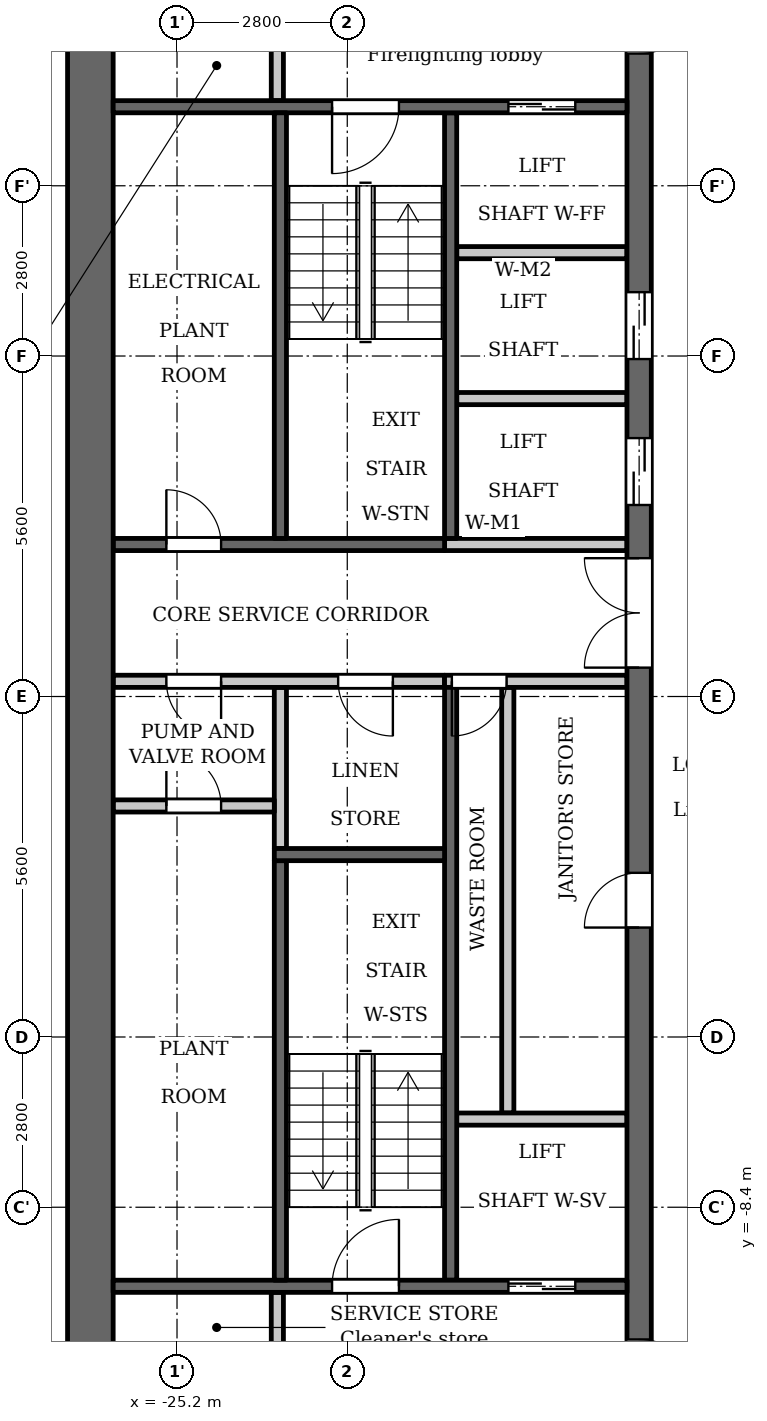
"""IFC4 building model, lengths in metres.
Left out: names, types, materials, properties, quantities, classifications, styles, units other than length and angle.
Written with IfcOpenShell. Run it as: python <this file> out.ifc"""

import sys

from ifc_helpers import new_model, si_unit, direction, frame, frame_2d, origin, place, context, subcontext, project, spatial, rectangle, extrude, element, fill, save


model = new_model("IFC4")
c1 = context("Model", 3, precision=1e-05, world=origin(), true_north=direction((0.0, 1.0)))
c2 = subcontext(c1, "Body", "Model", "MODEL_VIEW")
j1 = project(units=[si_unit("LENGTHUNIT", "METRE"), si_unit("PLANEANGLEUNIT", "RADIAN")], contexts=[c1])
p1 = place(None, origin())
s1 = spatial("IfcSite", under=j1, at=p1, CompositionType="ELEMENT")
p2 = place(p1, origin())
s2 = spatial("IfcBuilding", under=s1, at=p2, CompositionType="ELEMENT")
p3 = place(p2, frame((0.0, 0.0, 167.6)))
s3 = spatial("IfcBuildingStorey", under=s2, at=p3, CompositionType="ELEMENT", Elevation=167.6)
p4 = place(p3, frame((-23.5, -2.5, 0.0), z_axis=(0.0, 0.0, 1.0), x_axis=(0.0, 1.0, 0.0)))
e1 = element("IfcWall", 1, at=p4, inside=s3, PredefinedType="PARTITIONING", context=c2, shape_type="SweptSolid", body=[
    extrude(rectangle(XDim=2.65, YDim=0.2, at=frame_2d((1.325, 0.0))), origin(), (0.0, 0.0, 1.0), 3.2),
])
p5 = place(p3, frame((-20.7, 2.6, 0.0), z_axis=(0.0, 0.0, 1.0), x_axis=(0.0, 1.0, 0.0)))
e2 = element("IfcWall", 2, at=p5, inside=s3, PredefinedType="SHEAR", context=c2, shape_type="SweptSolid", body=[
    extrude(rectangle(XDim=7.0, YDim=0.2, at=frame_2d((3.5, 0.0))), origin(), (0.0, 0.0, 1.0), 3.2),
])
p6 = place(p3, frame((-20.7, -9.6, 0.0), z_axis=(0.0, 0.0, 1.0), x_axis=(0.0, 1.0, 0.0)))
e3 = element("IfcWall", 3, at=p6, inside=s3, PredefinedType="SHEAR", context=c2, shape_type="SweptSolid", body=[
    extrude(rectangle(XDim=9.75, YDim=0.2, at=frame_2d((4.875, 0.0))), origin(), (0.0, 0.0, 1.0), 3.2),
])
p7 = place(p3, frame((-20.8, 2.5, 0.0), z_axis=(0.0, 0.0, 1.0), x_axis=(-1.0, 0.0, 0.0)))
e4 = element("IfcWall", 4, at=p7, inside=s3, PredefinedType="SHEAR", context=c2, shape_type="SweptSolid", body=[
    extrude(rectangle(XDim=5.45, YDim=0.2, at=frame_2d((2.725, 0.0))), origin(), (0.0, 0.0, 1.0), 3.2),
])
p8 = place(p7, frame((3.675, 0.0, 0.0)))
e5 = element("IfcOpeningElement", 5, at=p8, cuts=e4, PredefinedType="OPENING", context=c2, shape_type="SweptSolid", body=[
    extrude(rectangle(XDim=0.9, YDim=2.1, at=frame_2d((0.45, 1.05))), frame((0.0, 0.11, 0.0), z_axis=(0.0, -1.0, 0.0), x_axis=(1.0, 0.0, 0.0)), (0.0, 0.0, 1.0), 0.22),
])
p9 = place(p3, frame((-20.8, 0.25, 0.0), z_axis=(0.0, 0.0, 1.0), x_axis=(-1.0, 0.0, 0.0)))
e6 = element("IfcWall", 6, at=p9, inside=s3, PredefinedType="PARTITIONING", context=c2, shape_type="SweptSolid", body=[
    extrude(rectangle(XDim=5.45, YDim=0.2, at=frame_2d((2.725, 0.0))), origin(), (0.0, 0.0, 1.0), 3.2),
])
p10 = place(p9, frame((0.85, 0.0, 0.0)))
e7 = element("IfcOpeningElement", 7, at=p10, cuts=e6, PredefinedType="OPENING", context=c2, shape_type="SweptSolid", body=[
    extrude(rectangle(XDim=0.9, YDim=2.1, at=frame_2d((0.45, 1.05))), frame((0.0, 0.11, 0.0), z_axis=(0.0, -1.0, 0.0), x_axis=(1.0, 0.0, 0.0)), (0.0, 0.0, 1.0), 0.22),
])
p11 = place(p9, frame((3.675, 0.0, 0.0)))
e8 = element("IfcOpeningElement", 8, at=p11, cuts=e6, PredefinedType="OPENING", context=c2, shape_type="SweptSolid", body=[
    extrude(rectangle(XDim=0.9, YDim=2.1, at=frame_2d((0.45, 1.05))), frame((0.0, 0.11, 0.0), z_axis=(0.0, -1.0, 0.0), x_axis=(1.0, 0.0, 0.0)), (0.0, 0.0, 1.0), 0.22),
])
p12 = place(p3, frame((-19.76, -6.85, 0.0), z_axis=(0.0, 0.0, 1.0), x_axis=(0.0, 1.0, 0.0)))
e9 = element("IfcWall", 9, at=p12, inside=s3, PredefinedType="PARTITIONING", context=c2, shape_type="SweptSolid", body=[
    extrude(rectangle(XDim=7.0, YDim=0.2, at=frame_2d((3.5, 0.0))), origin(), (0.0, 0.0, 1.0), 3.2),
])
p13 = place(p3, frame((-17.6, -12.45, 0.0), z_axis=(0.0, 0.0, 1.0), x_axis=(0.0, 1.0, 0.0)))
e10 = element("IfcWall", 10, at=p13, inside=s3, PredefinedType="SHEAR", context=c2, shape_type="SweptSolid", body=[
    extrude(rectangle(XDim=24.9, YDim=0.4, at=frame_2d((12.45, 0.0))), origin(), (0.0, 0.0, 1.0), 3.2),
])
p14 = place(p13, frame((8.65, 0.0, 0.0)))
e11 = element("IfcOpeningElement", 11, at=p14, cuts=e10, PredefinedType="OPENING", context=c2, shape_type="SweptSolid", body=[
    extrude(rectangle(XDim=0.9, YDim=2.1, at=frame_2d((0.45, 1.05))), frame((0.0, 0.21, 0.0), z_axis=(0.0, -1.0, 0.0), x_axis=(1.0, 0.0, 0.0)), (0.0, 0.0, 1.0), 0.42),
])
p15 = place(p13, frame((15.6, 0.0, 0.0)))
e12 = element("IfcOpeningElement", 12, at=p15, cuts=e10, PredefinedType="OPENING", context=c2, shape_type="SweptSolid", body=[
    extrude(rectangle(XDim=1.1, YDim=2.1, at=frame_2d((0.55, 1.05))), frame((0.0, 0.21, 0.0), z_axis=(0.0, -1.0, 0.0), x_axis=(1.0, 0.0, 0.0)), (0.0, 0.0, 1.0), 0.42),
])
p16 = place(p13, frame((18.0, 0.0, 0.0)))
e13 = element("IfcOpeningElement", 13, at=p16, cuts=e10, PredefinedType="OPENING", context=c2, shape_type="SweptSolid", body=[
    extrude(rectangle(XDim=1.1, YDim=2.1, at=frame_2d((0.55, 1.05))), frame((0.0, 0.21, 0.0), z_axis=(0.0, -1.0, 0.0), x_axis=(1.0, 0.0, 0.0)), (0.0, 0.0, 1.0), 0.42),
])
p17 = place(p13, frame((23.025, 0.0, 0.0)))
e14 = element("IfcOpeningElement", 14, at=p17, cuts=e10, PredefinedType="OPENING", context=c2, shape_type="SweptSolid", body=[
    extrude(rectangle(XDim=1.1, YDim=2.1, at=frame_2d((0.55, 1.05))), frame((0.0, 0.21, 0.0), z_axis=(0.0, -1.0, 0.0), x_axis=(1.0, 0.0, 0.0)), (0.0, 0.0, 1.0), 0.42),
])
p18 = place(p13, frame((0.775, 0.0, 0.0)))
e15 = element("IfcOpeningElement", 15, at=p18, cuts=e10, PredefinedType="OPENING", context=c2, shape_type="SweptSolid", body=[
    extrude(rectangle(XDim=1.1, YDim=2.1, at=frame_2d((0.55, 1.05))), frame((0.0, 0.21, 0.0), z_axis=(0.0, -1.0, 0.0), x_axis=(1.0, 0.0, 0.0)), (0.0, 0.0, 1.0), 0.42),
])
p19 = place(p13, frame((12.925, 0.0, 0.0)))
e16 = element("IfcOpeningElement", 16, at=p19, cuts=e10, PredefinedType="OPENING", context=c2, shape_type="SweptSolid", body=[
    extrude(rectangle(XDim=1.8, YDim=2.1, at=frame_2d((0.9, 1.05))), frame((0.0, 0.21, 0.0), z_axis=(0.0, -1.0, 0.0), x_axis=(1.0, 0.0, 0.0)), (0.0, 0.0, 1.0), 0.42),
])
p20 = place(p3, frame((-26.625, -12.45, 0.0), z_axis=(0.0, 0.0, 1.0), x_axis=(0.0, 1.0, 0.0)))
e17 = element("IfcWall", 17, at=p20, inside=s3, PredefinedType="SHEAR", context=c2, shape_type="SweptSolid", body=[
    extrude(rectangle(XDim=24.9, YDim=0.75, at=frame_2d((12.45, 0.0))), origin(), (0.0, 0.0, 1.0), 3.2),
])
p21 = place(p3, frame((-23.55, 9.8, 0.0), z_axis=(0.0, 0.0, 1.0), x_axis=(0.0, 1.0, 0.0)))
e18 = element("IfcWall", 18, at=p21, inside=s3, PredefinedType="PARTITIONING", context=c2, shape_type="SweptSolid", body=[
    extrude(rectangle(XDim=2.65, YDim=0.2, at=frame_2d((1.325, 0.0))), origin(), (0.0, 0.0, 1.0), 3.2),
])
p22 = place(p21, frame((0.875, 0.0, 0.0)))
e19 = element("IfcOpeningElement", 19, at=p22, cuts=e18, PredefinedType="OPENING", context=c2, shape_type="SweptSolid", body=[
    extrude(rectangle(XDim=0.9, YDim=2.1, at=frame_2d((0.45, 1.05))), frame((0.0, 0.11, 0.0), z_axis=(0.0, -1.0, 0.0), x_axis=(1.0, 0.0, 0.0)), (0.0, 0.0, 1.0), 0.22),
])
p23 = place(p3, frame((-23.55, -12.45, 0.0), z_axis=(0.0, 0.0, 1.0), x_axis=(0.0, 1.0, 0.0)))
e20 = element("IfcWall", 20, at=p23, inside=s3, PredefinedType="PARTITIONING", context=c2, shape_type="SweptSolid", body=[
    extrude(rectangle(XDim=2.65, YDim=0.2, at=frame_2d((1.325, 0.0))), origin(), (0.0, 0.0, 1.0), 3.2),
])
p24 = place(p23, frame((0.875, 0.0, 0.0)))
e21 = element("IfcOpeningElement", 21, at=p24, cuts=e20, PredefinedType="OPENING", context=c2, shape_type="SweptSolid", body=[
    extrude(rectangle(XDim=0.9, YDim=2.1, at=frame_2d((0.45, 1.05))), frame((0.0, 0.11, 0.0), z_axis=(0.0, -1.0, 0.0), x_axis=(1.0, 0.0, 0.0)), (0.0, 0.0, 1.0), 0.22),
])
p25 = place(p3, frame((-23.6, -1.8, 0.0), z_axis=(0.0, 0.0, 1.0), x_axis=(-1.0, 0.0, 0.0)))
e22 = element("IfcWall", 22, at=p25, inside=s3, PredefinedType="PARTITIONING", context=c2, shape_type="SweptSolid", body=[
    extrude(rectangle(XDim=2.65, YDim=0.2, at=frame_2d((1.325, 0.0))), origin(), (0.0, 0.0, 1.0), 3.2),
])
p26 = place(p25, frame((0.875, 0.0, 0.0)))
e23 = element("IfcOpeningElement", 23, at=p26, cuts=e22, PredefinedType="OPENING", context=c2, shape_type="SweptSolid", body=[
    extrude(rectangle(XDim=0.9, YDim=2.1, at=frame_2d((0.45, 1.05))), frame((0.0, 0.11, 0.0), z_axis=(0.0, -1.0, 0.0), x_axis=(1.0, 0.0, 0.0)), (0.0, 0.0, 1.0), 0.22),
])
p27 = place(p3, frame((-17.8, -9.7, 0.0), z_axis=(0.0, 0.0, 1.0), x_axis=(-1.0, 0.0, 0.0)))
e24 = element("IfcWall", 24, at=p27, inside=s3, PredefinedType="SHEAR", context=c2, shape_type="SweptSolid", body=[
    extrude(rectangle(XDim=8.45, YDim=0.2, at=frame_2d((4.225, 0.0))), origin(), (0.0, 0.0, 1.0), 3.2),
])
p28 = place(p27, frame((0.85, 0.0, 0.0)))
e25 = element("IfcOpeningElement", 25, at=p28, cuts=e24, PredefinedType="OPENING", context=c2, shape_type="SweptSolid", body=[
    extrude(rectangle(XDim=1.1, YDim=2.1, at=frame_2d((0.55, 1.05))), frame((0.0, 0.11, 0.0), z_axis=(0.0, -1.0, 0.0), x_axis=(1.0, 0.0, 0.0)), (0.0, 0.0, 1.0), 0.22),
])
p29 = place(p27, frame((3.75, 0.0, 0.0)))
e26 = element("IfcOpeningElement", 26, at=p29, cuts=e24, PredefinedType="OPENING", context=c2, shape_type="SweptSolid", body=[
    extrude(rectangle(XDim=1.1, YDim=2.1, at=frame_2d((0.55, 1.05))), frame((0.0, 0.11, 0.0), z_axis=(0.0, -1.0, 0.0), x_axis=(1.0, 0.0, 0.0)), (0.0, 0.0, 1.0), 0.22),
])
p30 = place(p3, frame((-17.8, -6.95, 0.0), z_axis=(0.0, 0.0, 1.0), x_axis=(-1.0, 0.0, 0.0)))
e27 = element("IfcWall", 27, at=p30, inside=s3, PredefinedType="PARTITIONING", context=c2, shape_type="SweptSolid", body=[
    extrude(rectangle(XDim=2.8, YDim=0.2, at=frame_2d((1.4, 0.0))), origin(), (0.0, 0.0, 1.0), 3.2),
])
p31 = place(p3, frame((-17.8, 0.25, 0.0), z_axis=(0.0, 0.0, 1.0), x_axis=(-1.0, 0.0, 0.0)))
e28 = element("IfcWall", 28, at=p31, inside=s3, PredefinedType="PARTITIONING", context=c2, shape_type="SweptSolid", body=[
    extrude(rectangle(XDim=3.0, YDim=0.2, at=frame_2d((1.5, 0.0))), origin(), (0.0, 0.0, 1.0), 3.2),
])
p32 = place(p31, frame((1.98, 0.0, 0.0)))
e29 = element("IfcOpeningElement", 29, at=p32, cuts=e28, PredefinedType="OPENING", context=c2, shape_type="SweptSolid", body=[
    extrude(rectangle(XDim=0.9, YDim=2.1, at=frame_2d((0.45, 1.05))), frame((0.0, 0.11, 0.0), z_axis=(0.0, -1.0, 0.0), x_axis=(1.0, 0.0, 0.0)), (0.0, 0.0, 1.0), 0.22),
])
p33 = place(p3, frame((-17.8, 2.5, 0.0), z_axis=(0.0, 0.0, 1.0), x_axis=(-1.0, 0.0, 0.0)))
e30 = element("IfcWall", 30, at=p33, inside=s3, PredefinedType="PARTITIONING", context=c2, shape_type="SweptSolid", body=[
    extrude(rectangle(XDim=3.0, YDim=0.2, at=frame_2d((1.5, 0.0))), origin(), (0.0, 0.0, 1.0), 3.2),
])
for number, where, z_axis, x_axis in (
    (31, (-17.8, 4.9, 0.0), (0.0, 0.0, 1.0), (-1.0, 0.0, 0.0)),
    (32, (-17.8, 7.3, 0.0), (0.0, 0.0, 1.0), (-1.0, 0.0, 0.0)),
):
    element("IfcWall", number, at=place(p3, frame(where, z_axis=z_axis, x_axis=x_axis)), inside=s3, PredefinedType="PARTITIONING", context=c2, shape_type="SweptSolid", body=[
        extrude(rectangle(XDim=2.8, YDim=0.2, at=frame_2d((1.4, 0.0))), origin(), (0.0, 0.0, 1.0), 3.2),
    ])
p34 = place(p3, frame((-17.8, 9.7, 0.0), z_axis=(0.0, 0.0, 1.0), x_axis=(-1.0, 0.0, 0.0)))
e33 = element("IfcWall", 33, at=p34, inside=s3, PredefinedType="SHEAR", context=c2, shape_type="SweptSolid", body=[
    extrude(rectangle(XDim=8.45, YDim=0.2, at=frame_2d((4.225, 0.0))), origin(), (0.0, 0.0, 1.0), 3.2),
])
p35 = place(p34, frame((0.85, 0.0, 0.0)))
e34 = element("IfcOpeningElement", 34, at=p35, cuts=e33, PredefinedType="OPENING", context=c2, shape_type="SweptSolid", body=[
    extrude(rectangle(XDim=1.1, YDim=2.1, at=frame_2d((0.55, 1.05))), frame((0.0, 0.11, 0.0), z_axis=(0.0, -1.0, 0.0), x_axis=(1.0, 0.0, 0.0)), (0.0, 0.0, 1.0), 0.22),
])
p36 = place(p34, frame((3.75, 0.0, 0.0)))
e35 = element("IfcOpeningElement", 35, at=p36, cuts=e33, PredefinedType="OPENING", context=c2, shape_type="SweptSolid", body=[
    extrude(rectangle(XDim=1.1, YDim=2.1, at=frame_2d((0.55, 1.05))), frame((0.0, 0.11, 0.0), z_axis=(0.0, -1.0, 0.0), x_axis=(1.0, 0.0, 0.0)), (0.0, 0.0, 1.0), 0.22),
])
p37 = place(p3, frame((-23.5, 2.6, 0.0), z_axis=(0.0, 0.0, 1.0), x_axis=(0.0, 1.0, 0.0)))
e36 = element("IfcWall", 36, at=p37, inside=s3, PredefinedType="SHEAR", context=c2, shape_type="SweptSolid", body=[
    extrude(rectangle(XDim=7.0, YDim=0.2, at=frame_2d((3.5, 0.0))), origin(), (0.0, 0.0, 1.0), 3.2),
])
p38 = place(p3, frame((-23.5, -9.6, 0.0), z_axis=(0.0, 0.0, 1.0), x_axis=(0.0, 1.0, 0.0)))
e37 = element("IfcWall", 37, at=p38, inside=s3, PredefinedType="SHEAR", context=c2, shape_type="SweptSolid", body=[
    extrude(rectangle(XDim=6.9, YDim=0.2, at=frame_2d((3.45, 0.0))), origin(), (0.0, 0.0, 1.0), 3.2),
])
p39 = place(p3, frame((-20.8, -2.6, 0.0), z_axis=(0.0, 0.0, 1.0), x_axis=(-1.0, 0.0, 0.0)))
e38 = element("IfcWall", 38, at=p39, inside=s3, PredefinedType="SHEAR", context=c2, shape_type="SweptSolid", body=[
    extrude(rectangle(XDim=2.8, YDim=0.2, at=frame_2d((1.4, 0.0))), origin(), (0.0, 0.0, 1.0), 3.2),
])
p40 = place(p28, origin())
e39 = element("IfcDoor", 39, at=p40, inside=s3, OperationType="DOUBLE_DOOR_SLIDING", PredefinedType="DOOR", context=c2, shape_type="SweptSolid", body=[
    extrude(rectangle(XDim=1.1, YDim=2.1, at=frame_2d((0.55, 1.05))), frame((0.0, 0.025, 0.0), z_axis=(0.0, -1.0, 0.0), x_axis=(1.0, 0.0, 0.0)), (0.0, 0.0, 1.0), 0.05),
])
fill(e25, e39)
p41 = place(p14, origin())
e40 = element("IfcDoor", 40, at=p41, inside=s3, OperationType="SINGLE_SWING_RIGHT", PredefinedType="DOOR", context=c2, shape_type="SweptSolid", body=[
    extrude(rectangle(XDim=0.9, YDim=2.1, at=frame_2d((0.45, 1.05))), frame((0.0, 0.025, 0.0), z_axis=(0.0, -1.0, 0.0), x_axis=(1.0, 0.0, 0.0)), (0.0, 0.0, 1.0), 0.05),
])
fill(e11, e40)
p42 = place(p32, origin())
e41 = element("IfcDoor", 41, at=p42, inside=s3, OperationType="SINGLE_SWING_LEFT", PredefinedType="DOOR", context=c2, shape_type="SweptSolid", body=[
    extrude(rectangle(XDim=0.9, YDim=2.1, at=frame_2d((0.45, 1.05))), frame((0.0, 0.025, 0.0), z_axis=(0.0, -1.0, 0.0), x_axis=(1.0, 0.0, 0.0)), (0.0, 0.0, 1.0), 0.05),
])
fill(e29, e41)
p43 = place(p15, origin())
e42 = element("IfcDoor", 42, at=p43, inside=s3, OperationType="DOUBLE_DOOR_SLIDING", PredefinedType="DOOR", context=c2, shape_type="SweptSolid", body=[
    extrude(rectangle(XDim=1.1, YDim=2.1, at=frame_2d((0.55, 1.05))), frame((0.0, 0.025, 0.0), z_axis=(0.0, -1.0, 0.0), x_axis=(1.0, 0.0, 0.0)), (0.0, 0.0, 1.0), 0.05),
])
fill(e12, e42)
p44 = place(p16, origin())
e43 = element("IfcDoor", 43, at=p44, inside=s3, OperationType="DOUBLE_DOOR_SLIDING", PredefinedType="DOOR", context=c2, shape_type="SweptSolid", body=[
    extrude(rectangle(XDim=1.1, YDim=2.1, at=frame_2d((0.55, 1.05))), frame((0.0, 0.025, 0.0), z_axis=(0.0, -1.0, 0.0), x_axis=(1.0, 0.0, 0.0)), (0.0, 0.0, 1.0), 0.05),
])
fill(e13, e43)
p45 = place(p35, origin())
e44 = element("IfcDoor", 44, at=p45, inside=s3, OperationType="DOUBLE_DOOR_SLIDING", PredefinedType="DOOR", context=c2, shape_type="SweptSolid", body=[
    extrude(rectangle(XDim=1.1, YDim=2.1, at=frame_2d((0.55, 1.05))), frame((0.0, 0.025, 0.0), z_axis=(0.0, -1.0, 0.0), x_axis=(1.0, 0.0, 0.0)), (0.0, 0.0, 1.0), 0.05),
])
fill(e34, e44)
p46 = place(p17, origin())
e45 = element("IfcDoor", 45, at=p46, inside=s3, OperationType="SINGLE_SWING_RIGHT", PredefinedType="DOOR", context=c2, shape_type="SweptSolid", body=[
    extrude(rectangle(XDim=1.1, YDim=2.1, at=frame_2d((0.55, 1.05))), frame((0.0, 0.025, 0.0), z_axis=(0.0, -1.0, 0.0), x_axis=(1.0, 0.0, 0.0)), (0.0, 0.0, 1.0), 0.05),
])
fill(e14, e45)
p47 = place(p18, origin())
e46 = element("IfcDoor", 46, at=p47, inside=s3, OperationType="SINGLE_SWING_LEFT", PredefinedType="DOOR", context=c2, shape_type="SweptSolid", body=[
    extrude(rectangle(XDim=1.1, YDim=2.1, at=frame_2d((0.55, 1.05))), frame((0.0, 0.025, 0.0), z_axis=(0.0, -1.0, 0.0), x_axis=(1.0, 0.0, 0.0)), (0.0, 0.0, 1.0), 0.05),
])
fill(e15, e46)
p48 = place(p36, origin())
e47 = element("IfcDoor", 47, at=p48, inside=s3, OperationType="SINGLE_SWING_LEFT", PredefinedType="DOOR", context=c2, shape_type="SweptSolid", body=[
    extrude(rectangle(XDim=1.1, YDim=2.1, at=frame_2d((0.55, 1.05))), frame((0.0, 0.025, 0.0), z_axis=(0.0, -1.0, 0.0), x_axis=(1.0, 0.0, 0.0)), (0.0, 0.0, 1.0), 0.05),
])
fill(e35, e47)
p49 = place(p29, origin())
e48 = element("IfcDoor", 48, at=p49, inside=s3, OperationType="SINGLE_SWING_LEFT", PredefinedType="DOOR", context=c2, shape_type="SweptSolid", body=[
    extrude(rectangle(XDim=1.1, YDim=2.1, at=frame_2d((0.55, 1.05))), frame((0.0, 0.025, 0.0), z_axis=(0.0, -1.0, 0.0), x_axis=(1.0, 0.0, 0.0)), (0.0, 0.0, 1.0), 0.05),
])
fill(e26, e48)
p50 = place(p19, origin())
e49 = element("IfcDoor", 49, at=p50, inside=s3, OperationType="DOUBLE_DOOR_SINGLE_SWING", PredefinedType="DOOR", context=c2, shape_type="SweptSolid", body=[
    extrude(rectangle(XDim=1.8, YDim=2.1, at=frame_2d((0.9, 1.05))), frame((0.0, 0.025, 0.0), z_axis=(0.0, -1.0, 0.0), x_axis=(1.0, 0.0, 0.0)), (0.0, 0.0, 1.0), 0.05),
])
fill(e16, e49)
p51 = place(p10, origin())
e50 = element("IfcDoor", 50, at=p51, inside=s3, OperationType="SINGLE_SWING_RIGHT", PredefinedType="DOOR", context=c2, shape_type="SweptSolid", body=[
    extrude(rectangle(XDim=0.9, YDim=2.1, at=frame_2d((0.45, 1.05))), frame((0.0, 0.025, 0.0), z_axis=(0.0, -1.0, 0.0), x_axis=(1.0, 0.0, 0.0)), (0.0, 0.0, 1.0), 0.05),
])
fill(e7, e50)
p52 = place(p26, origin())
e51 = element("IfcDoor", 51, at=p52, inside=s3, OperationType="SINGLE_SWING_RIGHT", PredefinedType="DOOR", context=c2, shape_type="SweptSolid", body=[
    extrude(rectangle(XDim=0.9, YDim=2.1, at=frame_2d((0.45, 1.05))), frame((0.0, 0.025, 0.0), z_axis=(0.0, -1.0, 0.0), x_axis=(1.0, 0.0, 0.0)), (0.0, 0.0, 1.0), 0.05),
])
fill(e23, e51)
p53 = place(p11, origin())
e52 = element("IfcDoor", 52, at=p53, inside=s3, OperationType="SINGLE_SWING_RIGHT", PredefinedType="DOOR", context=c2, shape_type="SweptSolid", body=[
    extrude(rectangle(XDim=0.9, YDim=2.1, at=frame_2d((0.45, 1.05))), frame((0.0, 0.025, 0.0), z_axis=(0.0, -1.0, 0.0), x_axis=(1.0, 0.0, 0.0)), (0.0, 0.0, 1.0), 0.05),
])
fill(e8, e52)
p54 = place(p8, origin())
e53 = element("IfcDoor", 53, at=p54, inside=s3, OperationType="SINGLE_SWING_RIGHT", PredefinedType="DOOR", context=c2, shape_type="SweptSolid", body=[
    extrude(rectangle(XDim=0.9, YDim=2.1, at=frame_2d((0.45, 1.05))), frame((0.0, 0.025, 0.0), z_axis=(0.0, -1.0, 0.0), x_axis=(1.0, 0.0, 0.0)), (0.0, 0.0, 1.0), 0.05),
])
fill(e5, e53)
save(model, sys.argv[1])
